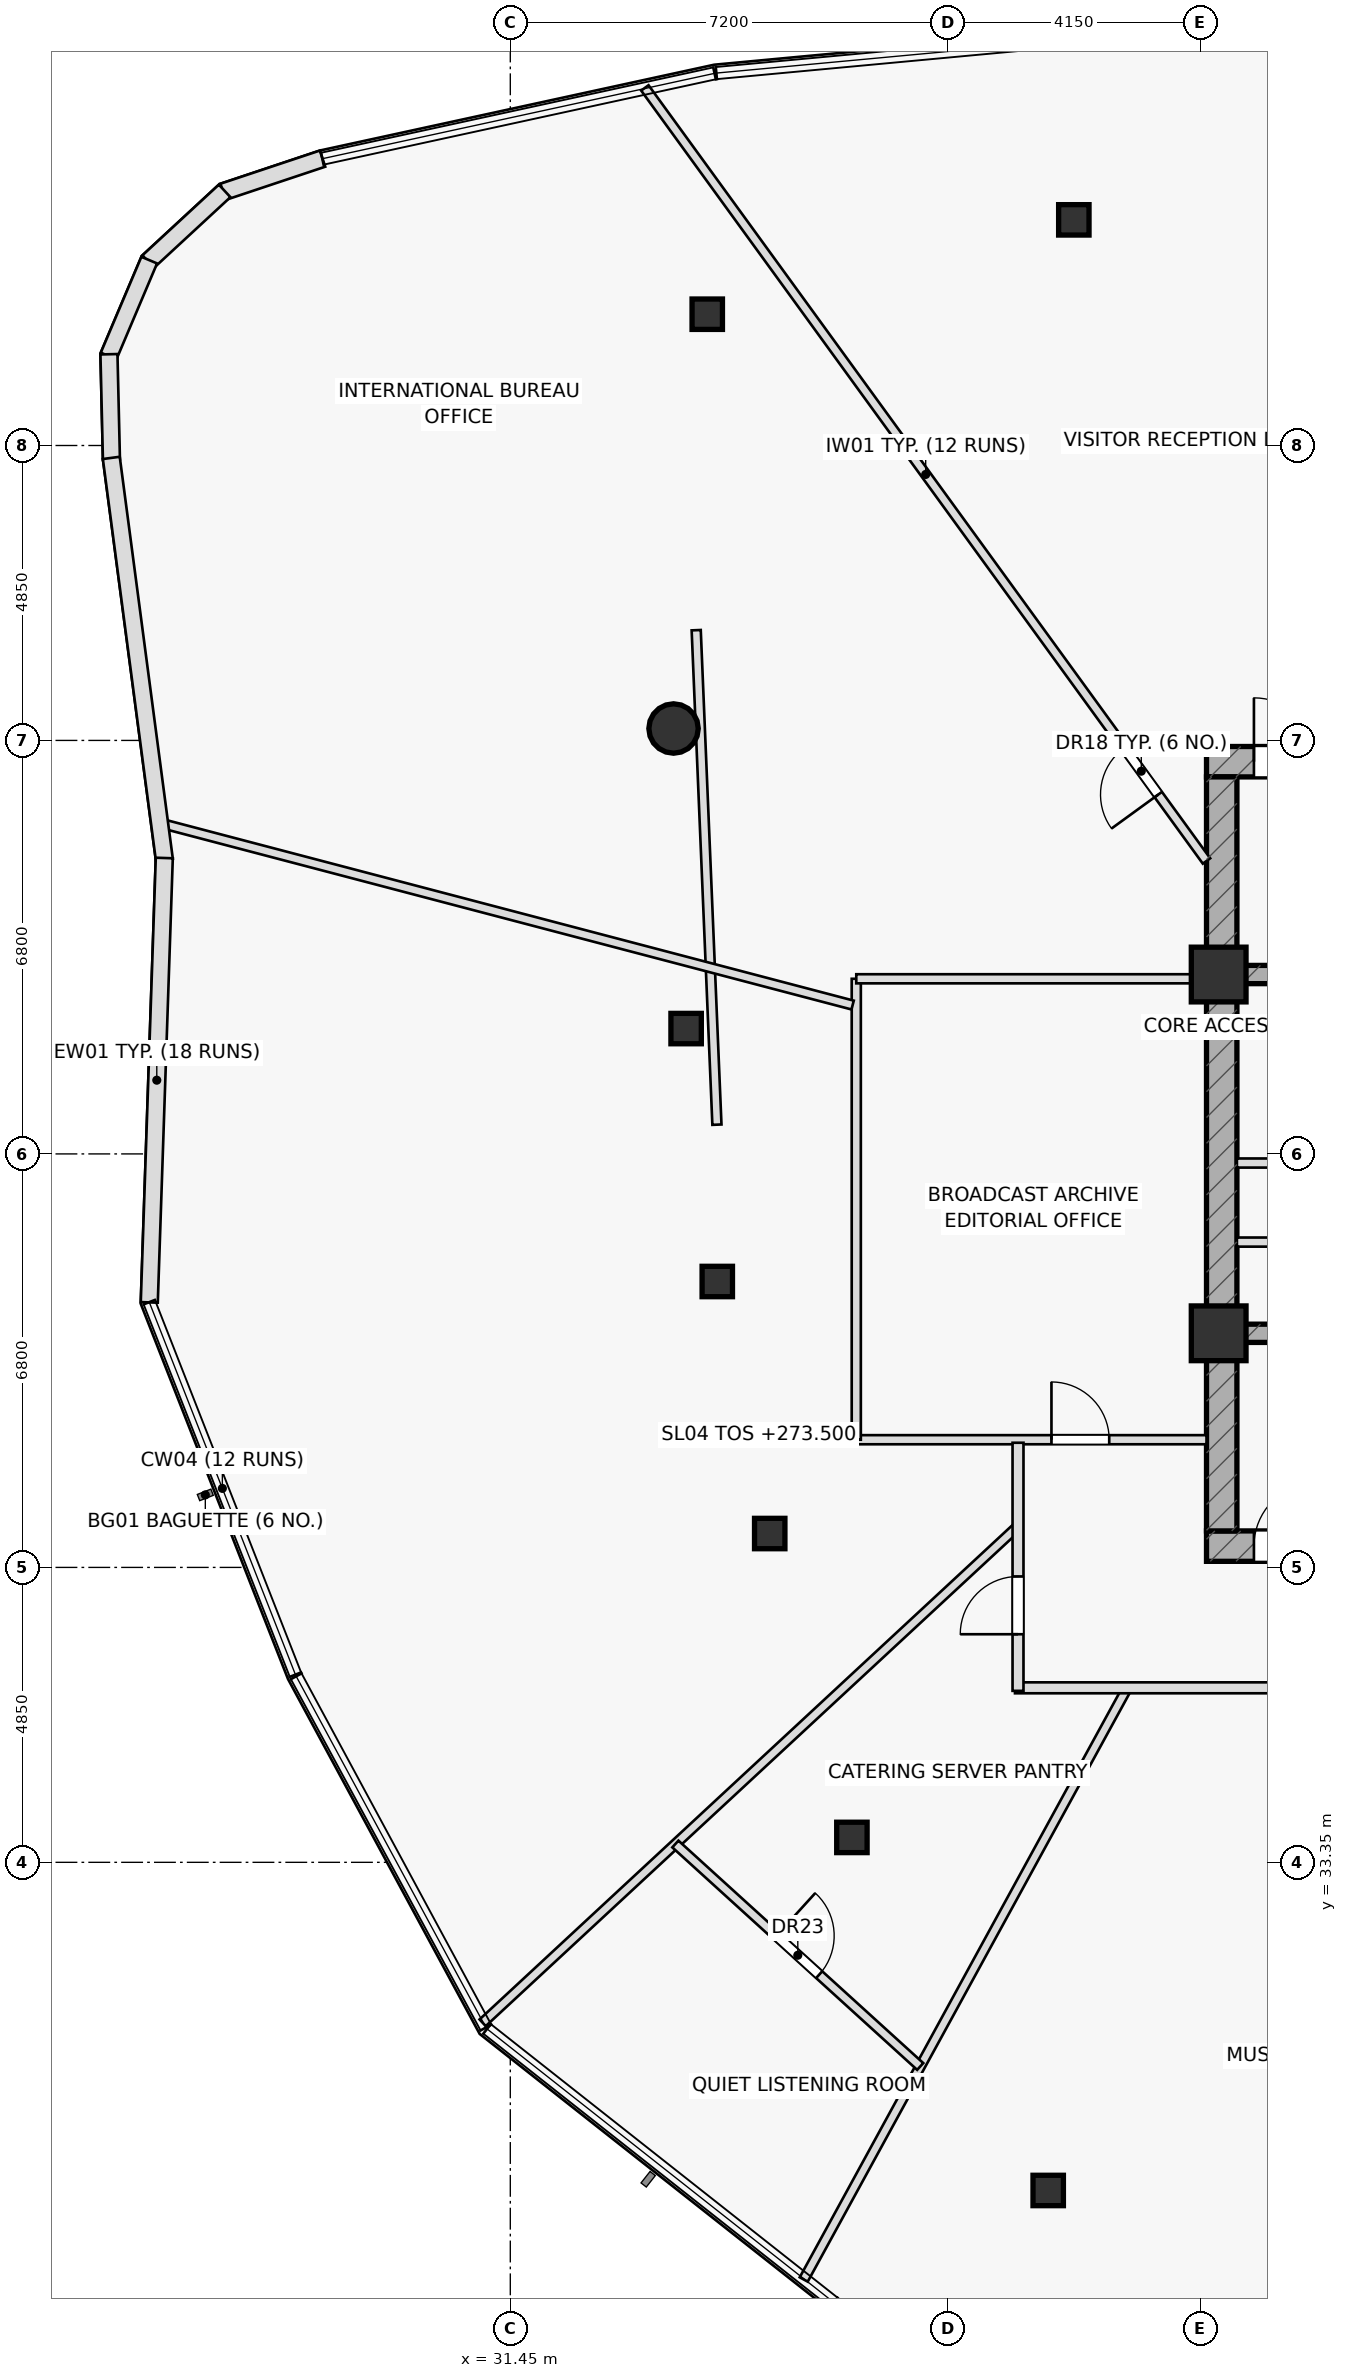
"""IFC4 building model, lengths in metres.
Left out: names, types, materials, properties, quantities, classifications, styles, units other than length and angle.
Written with IfcOpenShell. Run it as: python <this file> out.ifc"""

import sys

from ifc_helpers import new_model, si_unit, direction, frame, frame_2d, origin, origin_2d, place, context, subcontext, project, spatial, rectangle, hollow_rectangle, hollow_circle, extrude, element, fill, save


model = new_model("IFC4")
c1 = context("Model", 3, precision=1e-05, world=origin(), true_north=direction((0.0, 1.0)))
c2 = subcontext(c1, "Body", "Model", "MODEL_VIEW")
j1 = project(units=[si_unit("LENGTHUNIT", "METRE"), si_unit("PLANEANGLEUNIT", "RADIAN")], contexts=[c1])
p1 = place(None, origin())
s1 = spatial("IfcSite", under=j1, at=p1, CompositionType="ELEMENT")
p2 = place(p1, origin())
s2 = spatial("IfcBuilding", under=s1, at=p2, CompositionType="ELEMENT")
p3 = place(p2, frame((0.0, 0.0, 273.5)))
s3 = spatial("IfcBuildingStorey", under=s2, at=p3, CompositionType="ELEMENT", Elevation=273.5)
p4 = place(p3, frame((42.9, 51.45, 0.0), z_axis=(0.0, 0.0, 1.0), x_axis=(1.0, 0.0, 0.0)))
e1 = element("IfcWall", 1, at=p4, inside=s3, PredefinedType="SHEAR", context=c2, shape_type="SweptSolid", body=[
    extrude(rectangle(XDim=14.2, YDim=0.5, at=frame_2d((7.1, 0.0))), origin(), (0.0, 0.0, 1.0), 3.7),
])
p5 = place(p4, frame((0.78, 0.0, 0.0)))
e2 = element("IfcOpeningElement", 2, at=p5, cuts=e1, PredefinedType="OPENING", context=c2, shape_type="SweptSolid", body=[
    extrude(rectangle(XDim=1.05, YDim=2.2, at=frame_2d((0.525, 1.1))), frame((0.0, 0.26, 0.0), z_axis=(0.0, -1.0, 0.0), x_axis=(1.0, 0.0, 0.0)), (0.0, 0.0, 1.0), 0.52),
])
p6 = place(p3, frame((42.9, 38.55, 0.0), z_axis=(0.0, 0.0, 1.0), x_axis=(1.0, 0.0, 0.0)))
e3 = element("IfcWall", 3, at=p6, inside=s3, PredefinedType="SHEAR", context=c2, shape_type="SweptSolid", body=[
    extrude(rectangle(XDim=14.2, YDim=0.5, at=frame_2d((7.1, 0.0))), origin(), (0.0, 0.0, 1.0), 3.7),
])
p7 = place(p6, frame((0.78, 0.0, 0.0)))
e4 = element("IfcOpeningElement", 4, at=p7, cuts=e3, PredefinedType="OPENING", context=c2, shape_type="SweptSolid", body=[
    extrude(rectangle(XDim=1.05, YDim=2.2, at=frame_2d((0.525, 1.1))), frame((0.0, 0.26, 0.0), z_axis=(0.0, -1.0, 0.0), x_axis=(1.0, 0.0, 0.0)), (0.0, 0.0, 1.0), 0.52),
])
p8 = place(p3, frame((43.15, 38.8, 0.0), z_axis=(0.0, 0.0, 1.0), x_axis=(0.0, 1.0, 0.0)))
e5 = element("IfcWall", 5, at=p8, inside=s3, PredefinedType="SHEAR", context=c2, shape_type="SweptSolid", body=[
    extrude(rectangle(XDim=12.4, YDim=0.5, at=frame_2d((6.2, 0.0))), origin(), (0.0, 0.0, 1.0), 3.7),
])
p9 = place(p3, frame((43.4, 47.95, 0.0), z_axis=(0.0, 0.0, 1.0), x_axis=(1.0, 0.0, 0.0)))
e6 = element("IfcWall", 6, at=p9, inside=s3, PredefinedType="SHEAR", context=c2, shape_type="SweptSolid", body=[
    extrude(rectangle(XDim=13.2, YDim=0.3, at=frame_2d((6.6, 0.0))), origin(), (0.0, 0.0, 1.0), 3.7),
])
p10 = place(p9, frame((8.345, 0.0, 0.0)))
e7 = element("IfcOpeningElement", 7, at=p10, cuts=e6, PredefinedType="OPENING", context=c2, shape_type="SweptSolid", body=[
    extrude(rectangle(XDim=1.15, YDim=2.2, at=frame_2d((0.575, 1.1))), frame((0.0, 0.16, 0.0), z_axis=(0.0, -1.0, 0.0), x_axis=(1.0, 0.0, 0.0)), (0.0, 0.0, 1.0), 0.32),
])
p11 = place(p9, frame((10.065, 0.0, 0.0)))
e8 = element("IfcOpeningElement", 8, at=p11, cuts=e6, PredefinedType="OPENING", context=c2, shape_type="SweptSolid", body=[
    extrude(rectangle(XDim=1.15, YDim=2.2, at=frame_2d((0.575, 1.1))), frame((0.0, 0.16, 0.0), z_axis=(0.0, -1.0, 0.0), x_axis=(1.0, 0.0, 0.0)), (0.0, 0.0, 1.0), 0.32),
])
p12 = place(p9, frame((11.645, 0.0, 0.0)))
e9 = element("IfcOpeningElement", 9, at=p12, cuts=e6, PredefinedType="OPENING", context=c2, shape_type="SweptSolid", body=[
    extrude(rectangle(XDim=1.15, YDim=2.2, at=frame_2d((0.575, 1.1))), frame((0.0, 0.16, 0.0), z_axis=(0.0, -1.0, 0.0), x_axis=(1.0, 0.0, 0.0)), (0.0, 0.0, 1.0), 0.32),
])
p13 = place(p3, frame((43.4, 42.05, 0.0), z_axis=(0.0, 0.0, 1.0), x_axis=(1.0, 0.0, 0.0)))
e10 = element("IfcWall", 10, at=p13, inside=s3, PredefinedType="SHEAR", context=c2, shape_type="SweptSolid", body=[
    extrude(rectangle(XDim=13.2, YDim=0.3, at=frame_2d((6.6, 0.0))), origin(), (0.0, 0.0, 1.0), 3.7),
])
p14 = place(p13, frame((7.45, 0.0, 0.0)))
e11 = element("IfcOpeningElement", 11, at=p14, cuts=e10, PredefinedType="OPENING", context=c2, shape_type="SweptSolid", body=[
    extrude(rectangle(XDim=0.85, YDim=2.05, at=frame_2d((0.425, 1.025))), frame((0.0, 0.16, 0.0), z_axis=(0.0, -1.0, 0.0), x_axis=(1.0, 0.0, 0.0)), (0.0, 0.0, 1.0), 0.32),
])
p15 = place(p13, frame((9.5, 0.0, 0.0)))
e12 = element("IfcOpeningElement", 12, at=p15, cuts=e10, PredefinedType="OPENING", context=c2, shape_type="SweptSolid", body=[
    extrude(rectangle(XDim=0.85, YDim=2.05, at=frame_2d((0.425, 1.025))), frame((0.0, 0.16, 0.0), z_axis=(0.0, -1.0, 0.0), x_axis=(1.0, 0.0, 0.0)), (0.0, 0.0, 1.0), 0.32),
])
p16 = place(p13, frame((11.6, 0.0, 0.0)))
e13 = element("IfcOpeningElement", 13, at=p16, cuts=e10, PredefinedType="OPENING", context=c2, shape_type="SweptSolid", body=[
    extrude(rectangle(XDim=0.85, YDim=2.05, at=frame_2d((0.425, 1.025))), frame((0.0, 0.16, 0.0), z_axis=(0.0, -1.0, 0.0), x_axis=(1.0, 0.0, 0.0)), (0.0, 0.0, 1.0), 0.32),
])
for number, where, z_axis, x_axis in (
    (14, (43.1, 47.95, 0.0), (0.0, 0.0, 1.0), (1.0, 0.0, 0.0)),
    (15, (43.1, 42.05, 0.0), (0.0, 0.0, 1.0), (1.0, 0.0, 0.0)),
):
    element("IfcColumn", number, at=place(p3, frame(where, z_axis=z_axis, x_axis=x_axis)), inside=s3, PredefinedType="COLUMN", context=c2, shape_type="SweptSolid", body=[
        extrude(rectangle(XDim=0.9, YDim=0.9, at=origin_2d()), origin(), (0.0, 0.0, 1.0), 3.7),
    ])
p17 = place(p3, frame((34.135, 51.996, 0.0), z_axis=(0.0, 0.0, 1.0), x_axis=(1.0, 0.0, 0.0)))
e16 = element("IfcColumn", 16, at=p17, inside=s3, PredefinedType="COLUMN", context=c2, shape_type="SweptSolid", body=[
    extrude(hollow_circle(Radius=0.406, WallThickness=0.036, at=origin_2d()), origin(), (0.0, 0.0, 1.0), 3.7),
])
for number, where, z_axis, x_axis in (
    (17, (34.342, 47.061, 0.0), (0.0, 0.0, 1.0), (1.0, 0.0, 0.0)),
    (18, (34.854, 42.902, 0.0), (0.0, 0.0, 1.0), (1.0, 0.0, 0.0)),
    (19, (35.717, 38.757, 0.0), (0.0, 0.0, 1.0), (1.0, 0.0, 0.0)),
    (20, (37.068, 33.76, 0.0), (0.0, 0.0, 1.0), (1.0, 0.0, 0.0)),
    (21, (40.296, 27.954, 0.0), (0.0, 0.0, 1.0), (1.0, 0.0, 0.0)),
    (22, (40.718, 60.361, 0.0), (0.0, 0.0, 1.0), (1.0, 0.0, 0.0)),
    (23, (34.689, 58.809, 0.0), (0.0, 0.0, 1.0), (1.0, 0.0, 0.0)),
):
    element("IfcColumn", number, at=place(p3, frame(where, z_axis=z_axis, x_axis=x_axis)), inside=s3, PredefinedType="COLUMN", context=c2, shape_type="SweptSolid", body=[
        extrude(hollow_rectangle(XDim=0.5, YDim=0.5, WallThickness=0.03, at=origin_2d()), origin(), (0.0, 0.0, 1.0), 3.7),
    ])
for number, where, z_axis, x_axis in (
    (24, (43.4, 43.55, 0.0), (0.0, 0.0, 1.0), (1.0, 0.0, 0.0)),
    (25, (43.4, 44.85, 0.0), (0.0, 0.0, 1.0), (1.0, 0.0, 0.0)),
):
    element("IfcWall", number, at=place(p3, frame(where, z_axis=z_axis, x_axis=x_axis)), inside=s3, PredefinedType="PARTITIONING", context=c2, shape_type="SweptSolid", body=[
        extrude(rectangle(XDim=2.35, YDim=0.15, at=frame_2d((1.175, 0.0))), origin(), (0.0, 0.0, 1.0), 3.7),
    ])
p18 = place(p3, frame((34.507, 53.613, 0.0), z_axis=(0.0, 0.0, 1.0), x_axis=(0.041875090182, -0.999122853718, 0.0)))
e26 = element("IfcWall", 26, at=p18, inside=s3, PredefinedType="PARTITIONING", context=c2, shape_type="SweptSolid", body=[
    extrude(rectangle(XDim=8.139, YDim=0.15, at=frame_2d((4.069, 0.0))), origin(), (0.0, 0.0, 1.0), 3.235),
])
p19 = place(p3, frame((37.14, 40.3, 0.0), z_axis=(0.0, 0.0, 1.0), x_axis=(1.0, 0.0, 0.0)))
e27 = element("IfcWall", 27, at=p19, inside=s3, PredefinedType="PARTITIONING", context=c2, shape_type="SweptSolid", body=[
    extrude(rectangle(XDim=5.76, YDim=0.15, at=frame_2d((2.88, 0.0))), origin(), (0.0, 0.0, 1.0), 3.175),
])
p20 = place(p19, frame((3.21, 0.0, 0.0)))
e28 = element("IfcOpeningElement", 28, at=p20, cuts=e27, PredefinedType="OPENING", context=c2, shape_type="SweptSolid", body=[
    extrude(rectangle(XDim=0.95, YDim=2.05, at=frame_2d((0.475, 1.025))), frame((0.0, 0.085, 0.0), z_axis=(0.0, -1.0, 0.0), x_axis=(1.0, 0.0, 0.0)), (0.0, 0.0, 1.0), 0.17),
])
p21 = place(p3, frame((37.14, 40.3, 0.0), z_axis=(0.0, 0.0, 1.0), x_axis=(0.0, 1.0, 0.0)))
e29 = element("IfcWall", 29, at=p21, inside=s3, PredefinedType="PARTITIONING", context=c2, shape_type="SweptSolid", body=[
    extrude(rectangle(XDim=7.58, YDim=0.15, at=frame_2d((3.79, 0.0))), origin(), (0.0, 0.0, 1.0), 3.7),
])
p22 = place(p3, frame((37.14, 47.88, 0.0), z_axis=(0.0, 0.0, 1.0), x_axis=(1.0, 0.0, 0.0)))
e30 = element("IfcWall", 30, at=p22, inside=s3, PredefinedType="PARTITIONING", context=c2, shape_type="SweptSolid", body=[
    extrude(rectangle(XDim=5.76, YDim=0.15, at=frame_2d((2.88, 0.0))), origin(), (0.0, 0.0, 1.0), 3.7),
])
p23 = place(p3, frame((42.9, 49.817, 0.0), z_axis=(0.0, 0.0, 1.0), x_axis=(-0.587778112671, 0.809022181565, 0.0)))
e31 = element("IfcWall", 31, at=p23, inside=s3, PredefinedType="PARTITIONING", context=c2, shape_type="SweptSolid", body=[
    extrude(rectangle(XDim=15.715, YDim=0.15, at=frame_2d((7.857, 0.0))), origin(), (0.0, 0.0, 1.0), 3.175),
])
p24 = place(p23, frame((1.35, 0.0, 0.0)))
e32 = element("IfcOpeningElement", 32, at=p24, cuts=e31, PredefinedType="OPENING", context=c2, shape_type="SweptSolid", body=[
    extrude(rectangle(XDim=0.95, YDim=2.05, at=frame_2d((0.475, 1.025))), frame((0.0, 0.085, 0.0), z_axis=(0.0, -1.0, 0.0), x_axis=(1.0, 0.0, 0.0)), (0.0, 0.0, 1.0), 0.17),
])
p25 = place(p3, frame((37.08, 47.448, 0.0), z_axis=(0.0, 0.0, 1.0), x_axis=(-0.967188641059, 0.254059309232, 0.0)))
e33 = element("IfcWall", 33, at=p25, inside=s3, PredefinedType="PARTITIONING", context=c2, shape_type="SweptSolid", body=[
    extrude(rectangle(XDim=11.797, YDim=0.15, at=frame_2d((5.898, 0.0))), origin(), (0.0, 0.0, 1.0), 3.175),
])
p26 = place(p3, frame((39.8, 38.878, 0.0), z_axis=(0.0, 0.0, 1.0), x_axis=(-0.733167714009, -0.680047868267, 0.0)))
e34 = element("IfcWall", 34, at=p26, inside=s3, PredefinedType="PARTITIONING", context=c2, shape_type="SweptSolid", body=[
    extrude(rectangle(XDim=12.01, YDim=0.15, at=frame_2d((6.005, 0.0))), origin(), (0.0, 0.0, 1.0), 3.235),
])
p27 = place(p3, frame((41.598, 36.22, 0.0), z_axis=(0.0, 0.0, 1.0), x_axis=(-0.47986053117, -0.877344784349, 0.0)))
e35 = element("IfcWall", 35, at=p27, inside=s3, PredefinedType="PARTITIONING", context=c2, shape_type="SweptSolid", body=[
    extrude(rectangle(XDim=11.09, YDim=0.15, at=frame_2d((5.545, 0.0))), origin(), (0.0, 0.0, 1.0), 3.235),
])
p28 = place(p3, frame((34.165, 33.652, 0.0), z_axis=(0.0, 0.0, 1.0), x_axis=(0.740108571655, -0.67248739926, 0.0)))
e36 = element("IfcWall", 36, at=p28, inside=s3, PredefinedType="PARTITIONING", context=c2, shape_type="SweptSolid", body=[
    extrude(rectangle(XDim=5.441, YDim=0.15, at=frame_2d((2.72, 0.0))), origin(), (0.0, 0.0, 1.0), 3.7),
])
p29 = place(p28, frame((2.245, 0.0, 0.0)))
e37 = element("IfcOpeningElement", 37, at=p29, cuts=e36, PredefinedType="OPENING", context=c2, shape_type="SweptSolid", body=[
    extrude(rectangle(XDim=0.95, YDim=2.05, at=frame_2d((0.475, 1.025))), frame((0.0, 0.085, 0.0), z_axis=(0.0, -1.0, 0.0), x_axis=(1.0, 0.0, 0.0)), (0.0, 0.0, 1.0), 0.17),
])
p30 = place(p3, frame((59.23, 36.22, 0.0), z_axis=(0.0, 0.0, 1.0), x_axis=(-1.0, 0.0, 0.0)))
e38 = element("IfcWall", 38, at=p30, inside=s3, PredefinedType="PARTITIONING", context=c2, shape_type="SweptSolid", body=[
    extrude(rectangle(XDim=19.48, YDim=0.18, at=frame_2d((9.74, 0.0))), origin(), (0.0, 0.0, 1.0), 3.175),
])
p31 = place(p30, frame((4.731, 0.0, 0.0)))
e39 = element("IfcOpeningElement", 39, at=p31, cuts=e38, PredefinedType="OPENING", context=c2, shape_type="SweptSolid", body=[
    extrude(rectangle(XDim=0.95, YDim=2.05, at=frame_2d((0.475, 1.025))), frame((0.0, 0.1, 0.0), z_axis=(0.0, -1.0, 0.0), x_axis=(1.0, 0.0, 0.0)), (0.0, 0.0, 1.0), 0.2),
])
p32 = place(p30, frame((13.458, 0.0, 0.0)))
e40 = element("IfcOpeningElement", 40, at=p32, cuts=e38, PredefinedType="OPENING", context=c2, shape_type="SweptSolid", body=[
    extrude(rectangle(XDim=0.95, YDim=2.05, at=frame_2d((0.475, 1.025))), frame((0.0, 0.1, 0.0), z_axis=(0.0, -1.0, 0.0), x_axis=(1.0, 0.0, 0.0)), (0.0, 0.0, 1.0), 0.2),
])
p33 = place(p3, frame((39.8, 36.17, 0.0), z_axis=(0.0, 0.0, 1.0), x_axis=(0.0, 1.0, 0.0)))
e41 = element("IfcWall", 41, at=p33, inside=s3, PredefinedType="PARTITIONING", context=c2, shape_type="SweptSolid", body=[
    extrude(rectangle(XDim=4.08, YDim=0.18, at=frame_2d((2.04, 0.0))), origin(), (0.0, 0.0, 1.0), 3.7),
])
p34 = place(p33, frame((0.931, 0.0, 0.0)))
e42 = element("IfcOpeningElement", 42, at=p34, cuts=e41, PredefinedType="OPENING", context=c2, shape_type="SweptSolid", body=[
    extrude(rectangle(XDim=0.95, YDim=2.05, at=frame_2d((0.475, 1.025))), frame((0.0, 0.1, 0.0), z_axis=(0.0, -1.0, 0.0), x_axis=(1.0, 0.0, 0.0)), (0.0, 0.0, 1.0), 0.2),
])
p35 = place(p3, frame((28.362, 61.368, 0.0), z_axis=(0.0, 0.0, 1.0), x_axis=(-0.948584116037, -0.316525156665, 0.0)))
e43 = element("IfcWall", 43, at=p35, inside=s3, PredefinedType="STANDARD", context=c2, shape_type="SweptSolid", body=[
    extrude(rectangle(XDim=1.724, YDim=0.28, at=frame_2d((0.862, 0.0))), origin(), (0.0, 0.0, 1.0), 3.7),
])
p36 = place(p3, frame((26.752, 60.837, 0.0), z_axis=(0.0, 0.0, 1.0), x_axis=(-0.734294864486, -0.67883065045, 0.0)))
e44 = element("IfcWall", 44, at=p36, inside=s3, PredefinedType="STANDARD", context=c2, shape_type="SweptSolid", body=[
    extrude(rectangle(XDim=1.712, YDim=0.28, at=frame_2d((0.856, 0.0))), origin(), (0.0, 0.0, 1.0), 3.7),
])
p37 = place(p3, frame((25.511, 59.698, 0.0), z_axis=(0.0, 0.0, 1.0), x_axis=(-0.389974874074, -0.920825497905, 0.0)))
e45 = element("IfcWall", 45, at=p37, inside=s3, PredefinedType="STANDARD", context=c2, shape_type="SweptSolid", body=[
    extrude(rectangle(XDim=1.712, YDim=0.28, at=frame_2d((0.856, 0.0))), origin(), (0.0, 0.0, 1.0), 3.7),
])
p38 = place(p3, frame((24.849, 58.151, 0.0), z_axis=(0.0, 0.0, 1.0), x_axis=(0.023501390104, -0.99972380419, 0.0)))
e46 = element("IfcWall", 46, at=p38, inside=s3, PredefinedType="STANDARD", context=c2, shape_type="SweptSolid", body=[
    extrude(rectangle(XDim=1.735, YDim=0.28, at=frame_2d((0.867, 0.0))), origin(), (0.0, 0.0, 1.0), 3.7),
])
p39 = place(p3, frame((24.888, 56.446, 0.0), z_axis=(0.0, 0.0, 1.0), x_axis=(0.130954667764, -0.9913883573, 0.0)))
e47 = element("IfcWall", 47, at=p39, inside=s3, PredefinedType="STANDARD", context=c2, shape_type="SweptSolid", body=[
    extrude(rectangle(XDim=6.667, YDim=0.28, at=frame_2d((3.333, 0.0))), origin(), (0.0, 0.0, 1.0), 3.7),
])
p40 = place(p3, frame((25.76, 49.866, 0.0), z_axis=(0.0, 0.0, 1.0), x_axis=(-0.03378840639, -0.999429008781, 0.0)))
e48 = element("IfcWall", 48, at=p40, inside=s3, PredefinedType="STANDARD", context=c2, shape_type="SweptSolid", body=[
    extrude(rectangle(XDim=7.312, YDim=0.28, at=frame_2d((3.656, 0.0))), origin(), (0.0, 0.0, 1.0), 3.7),
])
p41 = place(p5, origin())
e49 = element("IfcDoor", 49, at=p41, inside=s3, OperationType="SINGLE_SWING_LEFT", PredefinedType="DOOR", context=c2, shape_type="SweptSolid", body=[
    extrude(rectangle(XDim=1.05, YDim=2.2, at=frame_2d((0.525, 1.1))), frame((0.0, 0.025, 0.0), z_axis=(0.0, -1.0, 0.0), x_axis=(1.0, 0.0, 0.0)), (0.0, 0.0, 1.0), 0.05),
])
fill(e2, e49)
p42 = place(p7, origin())
e50 = element("IfcDoor", 50, at=p42, inside=s3, OperationType="SINGLE_SWING_RIGHT", PredefinedType="DOOR", context=c2, shape_type="SweptSolid", body=[
    extrude(rectangle(XDim=1.05, YDim=2.2, at=frame_2d((0.525, 1.1))), frame((0.0, 0.025, 0.0), z_axis=(0.0, -1.0, 0.0), x_axis=(1.0, 0.0, 0.0)), (0.0, 0.0, 1.0), 0.05),
])
fill(e4, e50)
p43 = place(p20, origin())
e51 = element("IfcDoor", 51, at=p43, inside=s3, OperationType="SINGLE_SWING_LEFT", PredefinedType="DOOR", context=c2, shape_type="SweptSolid", body=[
    extrude(rectangle(XDim=0.95, YDim=2.05, at=frame_2d((0.475, 1.025))), frame((0.0, 0.025, 0.0), z_axis=(0.0, -1.0, 0.0), x_axis=(1.0, 0.0, 0.0)), (0.0, 0.0, 1.0), 0.05),
])
fill(e28, e51)
p44 = place(p24, origin())
e52 = element("IfcDoor", 52, at=p44, inside=s3, OperationType="SINGLE_SWING_LEFT", PredefinedType="DOOR", context=c2, shape_type="SweptSolid", body=[
    extrude(rectangle(XDim=0.95, YDim=2.05, at=frame_2d((0.475, 1.025))), frame((0.0, 0.025, 0.0), z_axis=(0.0, -1.0, 0.0), x_axis=(1.0, 0.0, 0.0)), (0.0, 0.0, 1.0), 0.05),
])
fill(e32, e52)
p45 = place(p29, origin())
e53 = element("IfcDoor", 53, at=p45, inside=s3, OperationType="SINGLE_SWING_LEFT", PredefinedType="DOOR", context=c2, shape_type="SweptSolid", body=[
    extrude(rectangle(XDim=0.95, YDim=2.05, at=frame_2d((0.475, 1.025))), frame((0.0, 0.025, 0.0), z_axis=(0.0, -1.0, 0.0), x_axis=(1.0, 0.0, 0.0)), (0.0, 0.0, 1.0), 0.05),
])
fill(e37, e53)
p46 = place(p34, origin())
e54 = element("IfcDoor", 54, at=p46, inside=s3, OperationType="SINGLE_SWING_LEFT", PredefinedType="DOOR", context=c2, shape_type="SweptSolid", body=[
    extrude(rectangle(XDim=0.95, YDim=2.05, at=frame_2d((0.475, 1.025))), frame((0.0, 0.025, 0.0), z_axis=(0.0, -1.0, 0.0), x_axis=(1.0, 0.0, 0.0)), (0.0, 0.0, 1.0), 0.05),
])
fill(e42, e54)
save(model, sys.argv[1])
